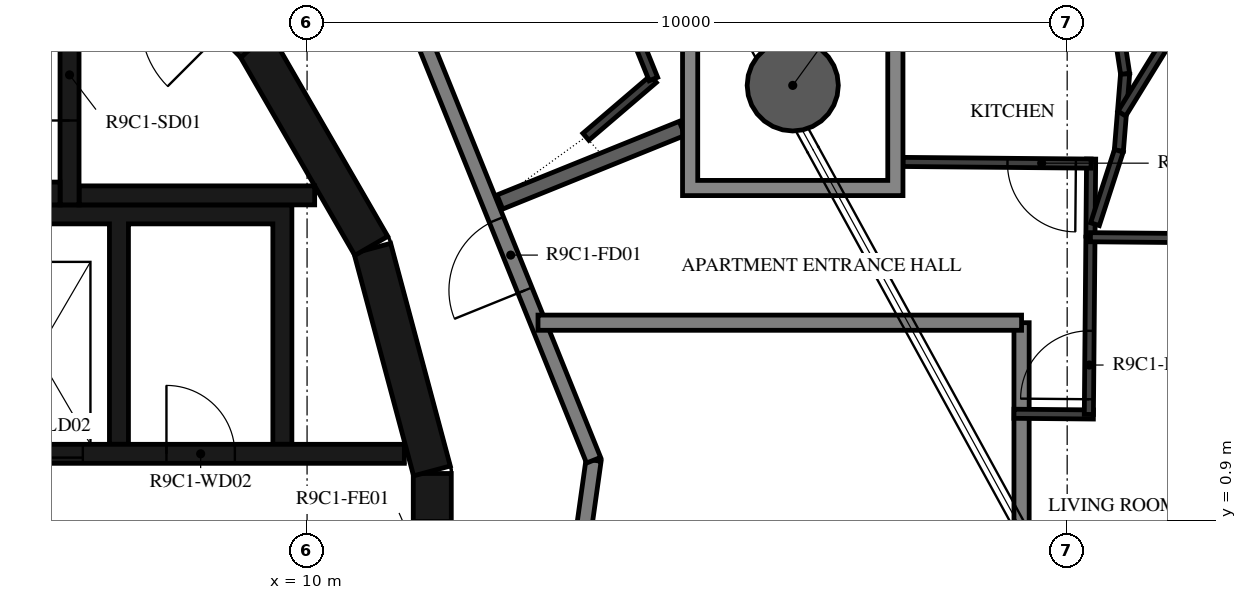
"""IFC4 building model, lengths in metres.
Left out: names, types, materials, properties, quantities, classifications, styles, units other than length and angle.
Written with IfcOpenShell. Run it as: python <this file> out.ifc"""

import sys

from ifc_helpers import new_model, si_unit, direction, frame, frame_2d, origin, origin_2d, place, context, subcontext, project, spatial, polyline, rectangle, hollow_circle, outline, extrude, element, fill, save


model = new_model("IFC4")
c1 = context("Model", 3, precision=1e-05, world=origin(), true_north=direction((0.0, 1.0)))
c2 = subcontext(c1, "Body", "Model", "MODEL_VIEW")
j1 = project(units=[si_unit("LENGTHUNIT", "METRE"), si_unit("PLANEANGLEUNIT", "RADIAN")], contexts=[c1])
p1 = place(None, origin())
s1 = spatial("IfcSite", under=j1, at=p1, CompositionType="ELEMENT")
p2 = place(p1, origin())
s2 = spatial("IfcBuilding", under=s1, at=p2, CompositionType="ELEMENT")
p3 = place(p2, frame((0.0, 0.0, 357.5)))
s3 = spatial("IfcBuildingStorey", under=s2, at=p3, CompositionType="ELEMENT", Elevation=357.5)
p4 = place(p3, frame((16.39, 6.622, -0.38), z_axis=(0.0, 0.0, 1.0), x_axis=(1.0, 0.0, 0.0)))
e1 = element("IfcColumn", 1, at=p4, inside=s3, PredefinedType="COLUMN", context=c2, shape_type="SweptSolid", body=[
    extrude(hollow_circle(Radius=0.6, WallThickness=0.03, at=origin_2d()), origin(), (0.0, 0.0, 1.0), 3.5),
])
p5 = place(p3, frame((11.647, -1.516, 0.0), z_axis=(0.0, 0.0, 1.0), x_axis=(0.0, 1.0, 0.0)))
e2 = element("IfcWall", 2, at=p5, inside=s3, PredefinedType="SHEAR", context=c2, shape_type="SweptSolid", body=[
    extrude(rectangle(XDim=3.033, YDim=0.5, at=frame_2d((1.516, 0.0))), origin(), (0.0, 0.0, 1.0), 3.12),
])
p6 = place(p5, frame((0.616, 0.0, 0.0)))
e3 = element("IfcOpeningElement", 3, at=p6, cuts=e2, PredefinedType="OPENING", context=c2, shape_type="SweptSolid", body=[
    extrude(rectangle(XDim=1.8, YDim=2.1, at=frame_2d((0.9, 1.05))), frame((0.0, 0.26, 0.0), z_axis=(0.0, -1.0, 0.0), x_axis=(1.0, 0.0, 0.0)), (0.0, 0.0, 1.0), 0.52),
])
for number, where, z_axis, x_axis in (
    (4, (11.643, 1.55, 0.0), (0.0, 0.0, 1.0), (-0.259, 0.966, 0.0)),
    (5, (10.845, 4.51, 0.0), (0.0, 0.0, 1.0), (-0.5, 0.866, 0.0)),
):
    element("IfcWall", number, at=place(p3, frame(where, z_axis=z_axis, x_axis=x_axis)), inside=s3, PredefinedType="SHEAR", context=c2, shape_type="SweptSolid", body=[
        extrude(rectangle(XDim=3.033, YDim=0.5, at=frame_2d((1.516, 0.0))), origin(), (0.0, 0.0, 1.0), 3.12),
    ])
p7 = place(p3, frame((9.308, 7.164, 0.0), z_axis=(0.0, 0.0, 1.0), x_axis=(-0.707106781187, 0.707106781187, 0.0)))
e6 = element("IfcWall", 6, at=p7, inside=s3, PredefinedType="SHEAR", context=c2, shape_type="SweptSolid", body=[
    extrude(rectangle(XDim=3.032, YDim=0.5, at=frame_2d((1.516, 0.0))), origin(), (0.0, 0.0, 1.0), 3.12),
])
p8 = place(p7, frame((0.416, 0.0, 0.0)))
e7 = element("IfcOpeningElement", 7, at=p8, cuts=e6, PredefinedType="OPENING", context=c2, shape_type="SweptSolid", body=[
    extrude(rectangle(XDim=1.2, YDim=2.1, at=frame_2d((0.6, 1.05))), frame((0.0, 0.26, 0.0), z_axis=(0.0, -1.0, 0.0), x_axis=(1.0, 0.0, 0.0)), (0.0, 0.0, 1.0), 0.52),
])
p9 = place(p3, frame((0.0, 5.2, 0.0), z_axis=(0.0, 0.0, 1.0), x_axis=(1.0, 0.0, 0.0)))
e8 = element("IfcWall", 8, at=p9, inside=s3, PredefinedType="SHEAR", context=c2, shape_type="SweptSolid", body=[
    extrude(rectangle(XDim=6.75, YDim=0.3, at=frame_2d((3.375, 0.0))), origin(), (0.0, 0.0, 1.0), 3.12),
])
p10 = place(p3, frame((6.875, 5.05, 0.0), z_axis=(0.0, 0.0, 1.0), x_axis=(0.0, 1.0, 0.0)))
e9 = element("IfcWall", 9, at=p10, inside=s3, PredefinedType="SHEAR", context=c2, shape_type="SweptSolid", body=[
    extrude(rectangle(XDim=3.92, YDim=0.25, at=frame_2d((1.96, 0.0))), origin(), (0.0, 0.0, 1.0), 3.12),
])
p11 = place(p10, frame((1.11, 0.0, 0.0)))
e10 = element("IfcOpeningElement", 10, at=p11, cuts=e9, PredefinedType="OPENING", context=c2, shape_type="SweptSolid", body=[
    extrude(rectangle(XDim=1.2, YDim=2.1, at=frame_2d((0.6, 1.05))), frame((0.0, 0.135, 0.0), z_axis=(0.0, -1.0, 0.0), x_axis=(1.0, 0.0, 0.0)), (0.0, 0.0, 1.0), 0.27),
])
p12 = place(p3, frame((7.0, 5.175, 0.0), z_axis=(0.0, 0.0, 1.0), x_axis=(1.0, 0.0, 0.0)))
e11 = element("IfcWall", 11, at=p12, inside=s3, PredefinedType="SHEAR", context=c2, shape_type="SweptSolid", body=[
    extrude(rectangle(XDim=3.1, YDim=0.25, at=frame_2d((1.55, 0.0))), origin(), (0.0, 0.0, 1.0), 3.12),
])
p13 = place(p3, origin())
e12 = element("IfcWall", 12, at=p13, inside=s3, PredefinedType="SHEAR", context=c2, shape_type="SweptSolid", body=[
    extrude(outline(polyline([(-9.8, 1.9), (-9.55, 1.9), (-9.55, 4.8), (3.1, 4.8), (3.1, 1.9), (3.35, 1.9), (3.35, 4.8), (5.25, 4.8), (5.25, 1.9), (5.5, 1.9), (5.5, 4.8), (7.4, 4.8), (7.4, 1.9), (7.65, 1.9), (7.65, 4.8), (9.55, 4.8), (9.55, 1.9), (9.8, 1.9), (9.8, 4.8), (9.8, 5.05), (-9.8, 5.05), (-9.8, 4.8), (-9.8, 1.9)])), origin(), (0.0, 0.0, 1.0), 3.12),
])
p14 = place(p3, frame((3.35, 1.775, 0.0), z_axis=(0.0, 0.0, 1.0), x_axis=(1.0, 0.0, 0.0)))
e13 = element("IfcWall", 13, at=p14, inside=s3, PredefinedType="SHEAR", context=c2, shape_type="SweptSolid", body=[
    extrude(rectangle(XDim=7.93, YDim=0.25, at=frame_2d((3.965, 0.0))), origin(), (0.0, 0.0, 1.0), 3.12),
])
p15 = place(p14, frame((0.35, 0.0, 0.0)))
e14 = element("IfcOpeningElement", 14, at=p15, cuts=e13, PredefinedType="OPENING", context=c2, shape_type="SweptSolid", body=[
    extrude(rectangle(XDim=1.2, YDim=2.4, at=frame_2d((0.6, 1.2))), frame((0.0, 0.135, 0.0), z_axis=(0.0, -1.0, 0.0), x_axis=(1.0, 0.0, 0.0)), (0.0, 0.0, 1.0), 0.27),
])
p16 = place(p14, frame((2.5, 0.0, 0.0)))
e15 = element("IfcOpeningElement", 15, at=p16, cuts=e13, PredefinedType="OPENING", context=c2, shape_type="SweptSolid", body=[
    extrude(rectangle(XDim=1.2, YDim=2.4, at=frame_2d((0.6, 1.2))), frame((0.0, 0.135, 0.0), z_axis=(0.0, -1.0, 0.0), x_axis=(1.0, 0.0, 0.0)), (0.0, 0.0, 1.0), 0.27),
])
p17 = place(p14, frame((4.8, 0.0, 0.0)))
e16 = element("IfcOpeningElement", 16, at=p17, cuts=e13, PredefinedType="OPENING", context=c2, shape_type="SweptSolid", body=[
    extrude(rectangle(XDim=0.9, YDim=2.1, at=frame_2d((0.45, 1.05))), frame((0.0, 0.135, 0.0), z_axis=(0.0, -1.0, 0.0), x_axis=(1.0, 0.0, 0.0)), (0.0, 0.0, 1.0), 0.27),
])
p18 = place(p3, frame((12.77, -5.42, 0.0), z_axis=(0.0, 0.0, 1.0), x_axis=(0.139155334385, 0.990270565508, 0.0)))
e17 = element("IfcWall", 17, at=p18, inside=s3, PredefinedType="STANDARD", context=c2, shape_type="SweptSolid", body=[
    extrude(rectangle(XDim=7.181, YDim=0.2, at=frame_2d((3.59, 0.0))), origin(), (0.0, 0.0, 1.0), 3.12),
])
p19 = place(p18, frame((2.039, 0.0, 0.0)))
e18 = element("IfcOpeningElement", 18, at=p19, cuts=e17, PredefinedType="OPENING", context=c2, shape_type="SweptSolid", body=[
    extrude(rectangle(XDim=1.8, YDim=2.1, at=frame_2d((0.9, 1.05))), frame((0.0, 0.11, 0.0), z_axis=(0.0, -1.0, 0.0), x_axis=(1.0, 0.0, 0.0)), (0.0, 0.0, 1.0), 0.22),
])
p20 = place(p3, frame((13.769, 1.691, 0.0), z_axis=(0.0, 0.0, 1.0), x_axis=(-0.374618189599, 0.92717916932, 0.0)))
e19 = element("IfcWall", 19, at=p20, inside=s3, PredefinedType="STANDARD", context=c2, shape_type="SweptSolid", body=[
    extrude(rectangle(XDim=7.181, YDim=0.2, at=frame_2d((3.591, 0.0))), origin(), (0.0, 0.0, 1.0), 3.12),
])
p21 = place(p20, frame((2.41, 0.0, 0.0)))
e20 = element("IfcOpeningElement", 20, at=p21, cuts=e19, PredefinedType="OPENING", context=c2, shape_type="SweptSolid", body=[
    extrude(rectangle(XDim=1.0, YDim=2.1, at=frame_2d((0.5, 1.05))), frame((0.0, 0.11, 0.0), z_axis=(0.0, -1.0, 0.0), x_axis=(1.0, 0.0, 0.0)), (0.0, 0.0, 1.0), 0.22),
])
p22 = place(p3, frame((19.4, -2.519, 0.0), z_axis=(0.0, 0.0, 1.0), x_axis=(0.0, 1.0, 0.0)))
e21 = element("IfcWall", 21, at=p22, inside=s3, PredefinedType="STANDARD", context=c2, shape_type="SweptSolid", body=[
    extrude(rectangle(XDim=6.019, YDim=0.2, at=frame_2d((3.01, 0.0))), origin(), (0.0, 0.0, 1.0), 3.12),
])
p23 = place(p3, frame((19.4, 3.5, 0.0), z_axis=(0.0, 0.0, 1.0), x_axis=(-1.0, 0.0, 0.0)))
e22 = element("IfcWall", 22, at=p23, inside=s3, PredefinedType="STANDARD", context=c2, shape_type="SweptSolid", body=[
    extrude(rectangle(XDim=6.362, YDim=0.2, at=frame_2d((3.181, 0.0))), origin(), (0.0, 0.0, 1.0), 3.12),
])
p24 = place(p3, frame((14.934, 6.056, 0.0), z_axis=(0.0, 0.0, 1.0), x_axis=(-0.927181938396, -0.374611336071, 0.0)))
e23 = element("IfcWall", 23, at=p24, inside=s3, PredefinedType="STANDARD", context=c2, shape_type="SweptSolid", body=[
    extrude(rectangle(XDim=2.586, YDim=0.2, at=frame_2d((1.293, 0.0))), origin(), (0.0, 0.0, 1.0), 3.12),
])
p25 = place(p3, frame((19.3, 2.302, 0.0), z_axis=(0.0, 0.0, 1.0), x_axis=(0.999958506341, -0.009109643015, 0.0)))
e24 = element("IfcWall", 24, at=p25, inside=s3, PredefinedType="PARTITIONING", context=c2, shape_type="SweptSolid", body=[
    extrude(rectangle(XDim=1.045, YDim=0.12, at=frame_2d((0.522, 0.0))), origin(), (0.0, 0.0, 1.0), 3.12),
])
p26 = place(p3, frame((20.285, 2.293, 0.0), z_axis=(0.0, 0.0, 1.0), x_axis=(0.008900171034, 0.999960392693, 0.0)))
e25 = element("IfcWall", 25, at=p26, inside=s3, PredefinedType="PARTITIONING", context=c2, shape_type="SweptSolid", body=[
    extrude(rectangle(XDim=2.332, YDim=0.12, at=frame_2d((1.166, 0.0))), origin(), (0.0, 0.0, 1.0), 3.12),
])
p27 = place(p26, frame((0.2, 0.0, 0.0)))
e26 = element("IfcOpeningElement", 26, at=p27, cuts=e25, PredefinedType="OPENING", context=c2, shape_type="SweptSolid", body=[
    extrude(rectangle(XDim=0.9, YDim=2.1, at=frame_2d((0.45, 1.05))), frame((0.0, 0.07, 0.0), z_axis=(0.0, -1.0, 0.0), x_axis=(1.0, 0.0, 0.0)), (0.0, 0.0, 1.0), 0.14),
])
p28 = place(p3, frame((20.306, 4.639, 0.0), z_axis=(0.0, 0.0, 1.0), x_axis=(0.008906724211, 0.999960334345, 0.0)))
e27 = element("IfcWall", 27, at=p28, inside=s3, PredefinedType="PARTITIONING", context=c2, shape_type="SweptSolid", body=[
    extrude(rectangle(XDim=1.014, YDim=0.12, at=frame_2d((0.507, 0.0))), origin(), (0.0, 0.0, 1.0), 3.12),
])
p29 = place(p3, frame((20.315, 5.593, 0.0), z_axis=(0.0, 0.0, 1.0), x_axis=(-0.999960597409, 0.008877140833, 0.0)))
e28 = element("IfcWall", 28, at=p29, inside=s3, PredefinedType="PARTITIONING", context=c2, shape_type="SweptSolid", body=[
    extrude(rectangle(XDim=2.475, YDim=0.12, at=frame_2d((1.238, 0.0))), origin(), (0.0, 0.0, 1.0), 3.12),
])
p30 = place(p29, frame((0.2, 0.0, 0.0)))
e29 = element("IfcOpeningElement", 29, at=p30, cuts=e28, PredefinedType="OPENING", context=c2, shape_type="SweptSolid", body=[
    extrude(rectangle(XDim=0.9, YDim=2.1, at=frame_2d((0.45, 1.05))), frame((0.0, 0.07, 0.0), z_axis=(0.0, -1.0, 0.0), x_axis=(1.0, 0.0, 0.0)), (0.0, 0.0, 1.0), 0.14),
])
p31 = place(p3, frame((24.085, 4.591, 0.0), z_axis=(0.0, 0.0, 1.0), x_axis=(-0.99996025077, 0.008916102255, 0.0)))
e30 = element("IfcWall", 30, at=p31, inside=s3, PredefinedType="PARTITIONING", context=c2, shape_type="SweptSolid", body=[
    extrude(rectangle(XDim=3.779, YDim=0.12, at=frame_2d((1.889, 0.0))), origin(), (0.0, 0.0, 1.0), 2.73),
])
p32 = place(p31, frame((0.2, 0.0, 0.0)))
e31 = element("IfcOpeningElement", 31, at=p32, cuts=e30, PredefinedType="OPENING", context=c2, shape_type="SweptSolid", body=[
    extrude(rectangle(XDim=0.9, YDim=2.1, at=frame_2d((0.45, 1.05))), frame((0.0, 0.07, 0.0), z_axis=(0.0, -1.0, 0.0), x_axis=(1.0, 0.0, 0.0)), (0.0, 0.0, 1.0), 0.14),
])
p33 = place(p3, frame((20.762, 6.775, 0.0), z_axis=(0.0, 0.0, 1.0), x_axis=(-0.08121587, -0.996696534789, 0.0)))
e32 = element("IfcWall", 32, at=p33, inside=s3, PredefinedType="PARTITIONING", context=c2, shape_type="SweptSolid", body=[
    extrude(rectangle(XDim=1.016, YDim=0.12, at=frame_2d((0.508, 0.0))), origin(), (0.0, 0.0, 1.0), 3.12),
])
p34 = place(p3, frame((20.68, 5.762, 0.0), z_axis=(0.0, 0.0, 1.0), x_axis=(-0.30908063779, -0.951035834942, 0.0)))
e33 = element("IfcWall", 33, at=p34, inside=s3, PredefinedType="PARTITIONING", context=c2, shape_type="SweptSolid", body=[
    extrude(rectangle(XDim=1.016, YDim=0.12, at=frame_2d((0.508, 0.0))), origin(), (0.0, 0.0, 1.0), 3.12),
])
p35 = place(p3, frame((23.357, 10.532, 0.0), z_axis=(0.0, 0.0, 1.0), x_axis=(-0.524476563806, -0.851424884542, 0.0)))
e34 = element("IfcWall", 34, at=p35, inside=s3, PredefinedType="PARTITIONING", context=c2, shape_type="SweptSolid", body=[
    extrude(rectangle(XDim=5.029, YDim=0.12, at=frame_2d((2.515, 0.0))), origin(), (0.0, 0.0, 1.0), 3.12),
])
p36 = place(p35, frame((1.5, 0.0, 0.0)))
e35 = element("IfcOpeningElement", 35, at=p36, cuts=e34, PredefinedType="OPENING", context=c2, shape_type="SweptSolid", body=[
    extrude(rectangle(XDim=0.8, YDim=2.1, at=frame_2d((0.4, 1.05))), frame((0.0, 0.07, 0.0), z_axis=(0.0, -1.0, 0.0), x_axis=(1.0, 0.0, 0.0)), (0.0, 0.0, 1.0), 0.14),
])
p37 = place(p3, frame((20.762, 6.775, 0.0), z_axis=(0.0, 0.0, 1.0), x_axis=(-0.150702440861, 0.988579169474, 0.0)))
e36 = element("IfcWall", 36, at=p37, inside=s3, PredefinedType="PARTITIONING", context=c2, shape_type="SweptSolid", body=[
    extrude(rectangle(XDim=1.016, YDim=0.12, at=frame_2d((0.508, 0.0))), origin(), (0.0, 0.0, 1.0), 3.12),
])
p38 = place(p3, frame((13.668, 5.946, 0.0), z_axis=(0.0, 0.0, 1.0), x_axis=(0.759993221436, 0.649930998931, 0.0)))
e37 = element("IfcWall", 37, at=p38, inside=s3, PredefinedType="PARTITIONING", context=c2, shape_type="SweptSolid", body=[
    extrude(rectangle(XDim=1.169, YDim=0.12, at=frame_2d((0.584, 0.0))), origin(), (0.0, 0.0, 1.0), 3.12),
])
p39 = place(p3, frame((14.556, 6.706, 0.0), z_axis=(0.0, 0.0, 1.0), x_axis=(-0.374599774633, 0.927186609505, 0.0)))
e38 = element("IfcWall", 38, at=p39, inside=s3, PredefinedType="PARTITIONING", context=c2, shape_type="SweptSolid", body=[
    extrude(rectangle(XDim=3.159, YDim=0.12, at=frame_2d((1.58, 0.0))), origin(), (0.0, 0.0, 1.0), 3.12),
])
p40 = place(p39, frame((1.3, 0.0, 0.0)))
e39 = element("IfcOpeningElement", 39, at=p40, cuts=e38, PredefinedType="OPENING", context=c2, shape_type="SweptSolid", body=[
    extrude(rectangle(XDim=0.9, YDim=2.1, at=frame_2d((0.45, 1.05))), frame((0.0, 0.07, 0.0), z_axis=(0.0, -1.0, 0.0), x_axis=(1.0, 0.0, 0.0)), (0.0, 0.0, 1.0), 0.14),
])
p41 = place(p3, origin())
e40 = element("IfcWall", 40, at=p41, inside=s3, PredefinedType="STANDARD", context=c2, shape_type="SweptSolid", body=[
    extrude(outline(polyline([(17.84, 8.072), (17.84, 5.172), (14.94, 5.172), (14.94, 8.072), (17.84, 8.072)]), holes=[polyline([(15.14, 5.372), (17.64, 5.372), (17.64, 7.872), (15.14, 7.872), (15.14, 5.372)])]), origin(), (0.0, 0.0, 1.0), 3.12),
])
p42 = place(p11, origin())
e41 = element("IfcDoor", 41, at=p42, inside=s3, OperationType="SINGLE_SWING_LEFT", PredefinedType="DOOR", context=c2, shape_type="SweptSolid", body=[
    extrude(rectangle(XDim=1.2, YDim=2.1, at=frame_2d((0.6, 1.05))), frame((0.0, 0.025, 0.0), z_axis=(0.0, -1.0, 0.0), x_axis=(1.0, 0.0, 0.0)), (0.0, 0.0, 1.0), 0.05),
])
fill(e10, e41)
p43 = place(p16, origin())
e42 = element("IfcDoor", 42, at=p43, inside=s3, OperationType="DOUBLE_DOOR_SLIDING", PredefinedType="DOOR", context=c2, shape_type="SweptSolid", body=[
    extrude(rectangle(XDim=1.2, YDim=2.4, at=frame_2d((0.6, 1.2))), frame((0.0, 0.025, 0.0), z_axis=(0.0, -1.0, 0.0), x_axis=(1.0, 0.0, 0.0)), (0.0, 0.0, 1.0), 0.05),
])
fill(e15, e42)
p44 = place(p17, origin())
e43 = element("IfcDoor", 43, at=p44, inside=s3, OperationType="SINGLE_SWING_RIGHT", PredefinedType="DOOR", context=c2, shape_type="SweptSolid", body=[
    extrude(rectangle(XDim=0.9, YDim=2.1, at=frame_2d((0.45, 1.05))), frame((0.0, 0.025, 0.0), z_axis=(0.0, -1.0, 0.0), x_axis=(1.0, 0.0, 0.0)), (0.0, 0.0, 1.0), 0.05),
])
fill(e16, e43)
p45 = place(p21, origin())
e44 = element("IfcDoor", 44, at=p45, inside=s3, OperationType="SINGLE_SWING_LEFT", PredefinedType="DOOR", context=c2, shape_type="SweptSolid", body=[
    extrude(rectangle(XDim=1.0, YDim=2.1, at=frame_2d((0.5, 1.05))), frame((0.0, 0.025, 0.0), z_axis=(0.0, -1.0, 0.0), x_axis=(1.0, 0.0, 0.0)), (0.0, 0.0, 1.0), 0.05),
])
fill(e20, e44)
p46 = place(p27, origin())
e45 = element("IfcDoor", 45, at=p46, inside=s3, OperationType="SINGLE_SWING_RIGHT", PredefinedType="DOOR", context=c2, shape_type="SweptSolid", body=[
    extrude(rectangle(XDim=0.9, YDim=2.1, at=frame_2d((0.45, 1.05))), frame((0.0, 0.025, 0.0), z_axis=(0.0, -1.0, 0.0), x_axis=(1.0, 0.0, 0.0)), (0.0, 0.0, 1.0), 0.05),
])
fill(e26, e45)
p47 = place(p30, origin())
e46 = element("IfcDoor", 46, at=p47, inside=s3, OperationType="SINGLE_SWING_RIGHT", PredefinedType="DOOR", context=c2, shape_type="SweptSolid", body=[
    extrude(rectangle(XDim=0.9, YDim=2.1, at=frame_2d((0.45, 1.05))), frame((0.0, 0.025, 0.0), z_axis=(0.0, -1.0, 0.0), x_axis=(1.0, 0.0, 0.0)), (0.0, 0.0, 1.0), 0.05),
])
fill(e29, e46)
save(model, sys.argv[1])
